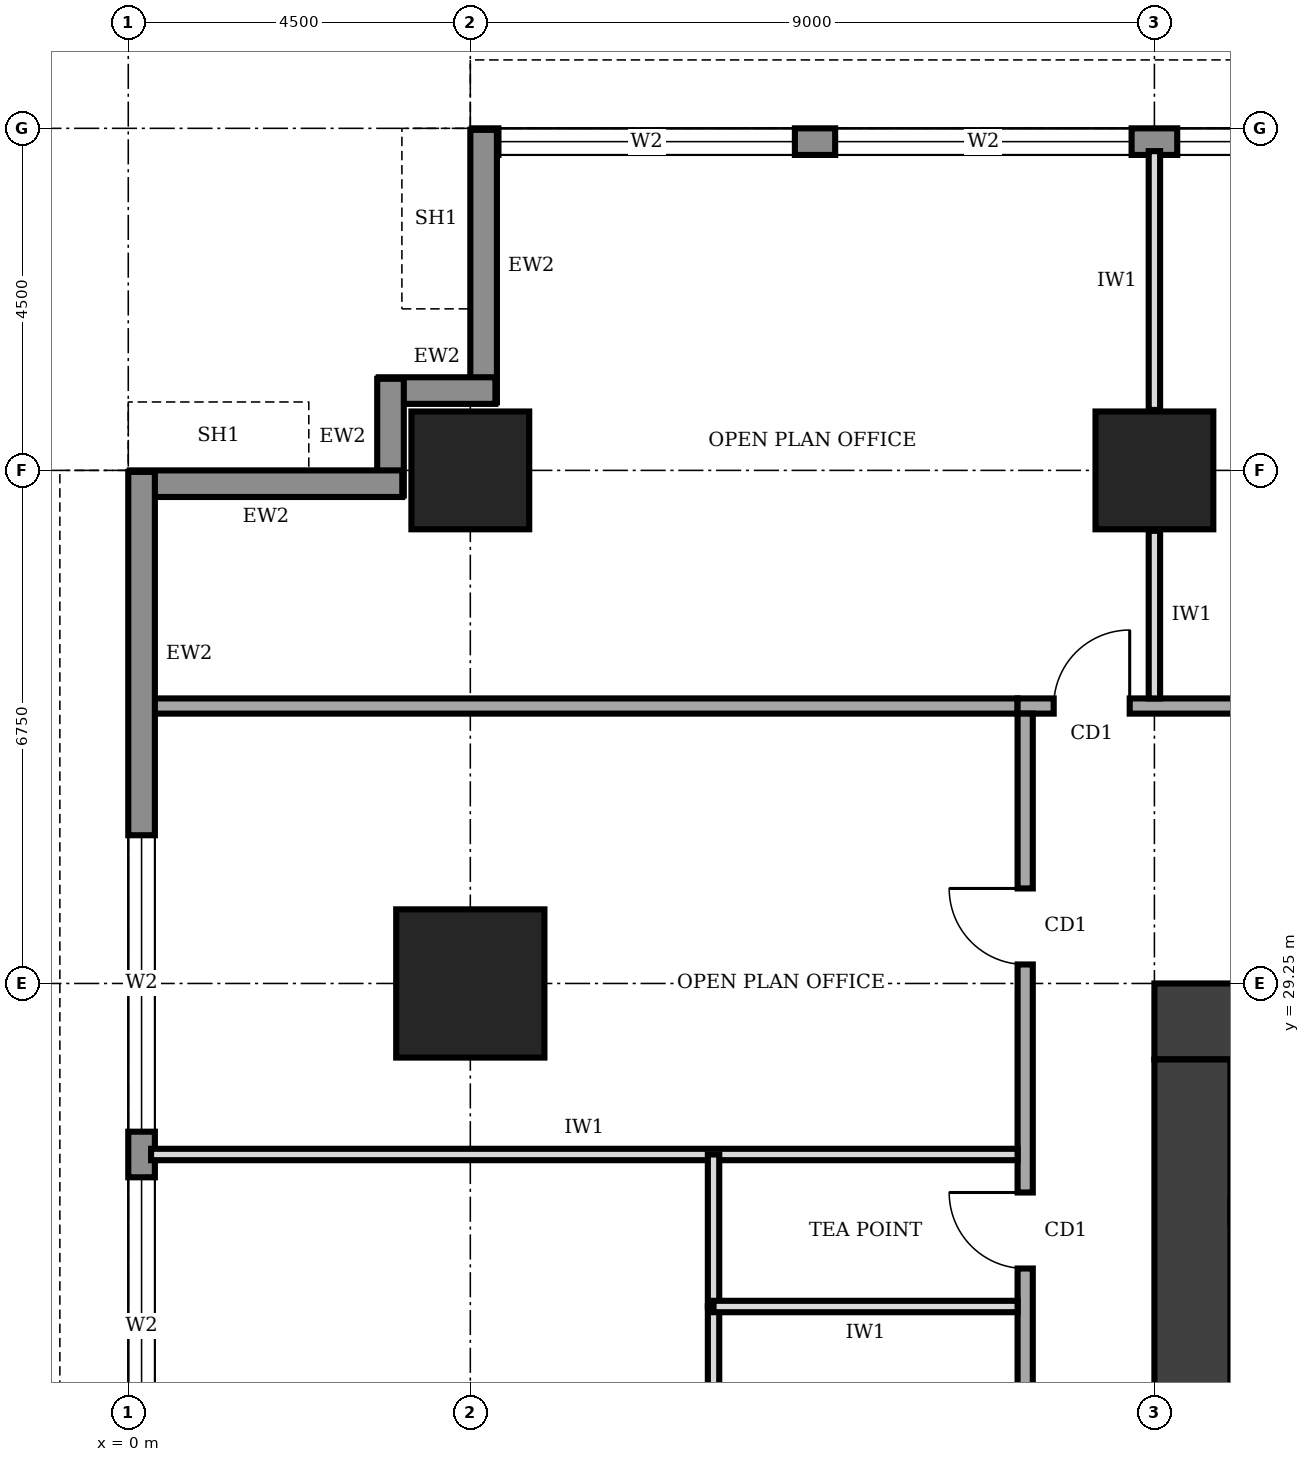
"""IFC4 building model, lengths in metres.
Left out: names, types, materials, properties, quantities, classifications, styles, units other than length and angle.
Written with IfcOpenShell. Run it as: python <this file> out.ifc"""

import sys

from ifc_helpers import new_model, si_unit, direction, frame, frame_2d, origin, origin_2d, place, context, subcontext, project, spatial, rectangle, extrude, element, fill, save


model = new_model("IFC4")
c1 = context("Model", 3, precision=1e-05, world=origin(), true_north=direction((0.0, 1.0)))
c2 = subcontext(c1, "Body", "Model", "MODEL_VIEW")
j1 = project(units=[si_unit("LENGTHUNIT", "METRE"), si_unit("PLANEANGLEUNIT", "RADIAN")], contexts=[c1])
p1 = place(None, origin())
s1 = spatial("IfcSite", under=j1, at=p1, CompositionType="ELEMENT")
p2 = place(p1, origin())
s2 = spatial("IfcBuilding", under=s1, at=p2, CompositionType="ELEMENT")
p3 = place(p2, frame((0.0, 0.0, 241.0)))
s3 = spatial("IfcBuildingStorey", under=s2, at=p3, CompositionType="ELEMENT", Elevation=241.0)
p4 = place(p3, frame((27.0, 28.75, 0.0), z_axis=(0.0, 0.0, 1.0), x_axis=(-1.0, 0.0, 0.0)))
e1 = element("IfcWall", 1, at=p4, inside=s3, PredefinedType="SHEAR", context=c2, shape_type="SweptSolid", body=[
    extrude(rectangle(XDim=13.5, YDim=1.0, at=frame_2d((6.75, 0.0))), origin(), (0.0, 0.0, 1.0), 4.0),
])
p5 = place(p4, frame((4.75, 0.0, 0.0)))
e2 = element("IfcOpeningElement", 2, at=p5, cuts=e1, PredefinedType="OPENING", context=c2, shape_type="SweptSolid", body=[
    extrude(rectangle(XDim=1.8, YDim=2.1, at=frame_2d((0.9, 1.05))), frame((0.0, 0.51, 0.0), z_axis=(0.0, -1.0, 0.0), x_axis=(1.0, 0.0, 0.0)), (0.0, 0.0, 1.0), 1.02),
])
p6 = place(p3, frame((14.0, 28.25, 0.0), z_axis=(0.0, 0.0, 1.0), x_axis=(0.0, -1.0, 0.0)))
e3 = element("IfcWall", 3, at=p6, inside=s3, PredefinedType="SHEAR", context=c2, shape_type="SweptSolid", body=[
    extrude(rectangle(XDim=16.0, YDim=1.0, at=frame_2d((8.0, 0.0))), origin(), (0.0, 0.0, 1.0), 4.0),
])
p7 = place(p3, frame((4.5, 29.25, 0.0), z_axis=(0.0, 0.0, 1.0), x_axis=(1.0, 0.0, 0.0)))
e4 = element("IfcColumn", 4, at=p7, inside=s3, PredefinedType="COLUMN", context=c2, shape_type="SweptSolid", body=[
    extrude(rectangle(XDim=1.95, YDim=1.95, at=origin_2d()), origin(), (0.0, 0.0, 1.0), 4.0),
])
for number, where, z_axis, x_axis in (
    (5, (4.5, 36.0, 0.0), (0.0, 0.0, 1.0), (1.0, 0.0, 0.0)),
    (6, (13.5, 36.0, 0.0), (0.0, 0.0, 1.0), (1.0, 0.0, 0.0)),
):
    element("IfcColumn", number, at=place(p3, frame(where, z_axis=z_axis, x_axis=x_axis)), inside=s3, PredefinedType="COLUMN", context=c2, shape_type="SweptSolid", body=[
        extrude(rectangle(XDim=1.55, YDim=1.55, at=origin_2d()), origin(), (0.0, 0.0, 1.0), 4.0),
    ])
p8 = place(p3, frame((35.98, 40.325, 0.0), z_axis=(0.0, 0.0, 1.0), x_axis=(-1.0, 0.0, 0.0)))
e7 = element("IfcWall", 7, at=p8, inside=s3, PredefinedType="STANDARD", context=c2, shape_type="SweptSolid", body=[
    extrude(rectangle(XDim=31.46, YDim=0.35, at=frame_2d((15.73, 0.0))), origin(), (0.0, 0.0, 1.0), 3.75),
])
p9 = place(p8, frame((27.21, 0.0, 0.6)))
e8 = element("IfcOpeningElement", 8, at=p9, cuts=e7, PredefinedType="OPENING", context=c2, shape_type="SweptSolid", body=[
    extrude(rectangle(XDim=3.9, YDim=2.6, at=frame_2d((1.95, 1.3))), frame((0.0, 0.185, 0.0), z_axis=(0.0, -1.0, 0.0), x_axis=(1.0, 0.0, 0.0)), (0.0, 0.0, 1.0), 0.37),
])
p10 = place(p8, frame((22.78, 0.0, 0.6)))
e9 = element("IfcOpeningElement", 9, at=p10, cuts=e7, PredefinedType="OPENING", context=c2, shape_type="SweptSolid", body=[
    extrude(rectangle(XDim=3.9, YDim=2.6, at=frame_2d((1.95, 1.3))), frame((0.0, 0.185, 0.0), z_axis=(0.0, -1.0, 0.0), x_axis=(1.0, 0.0, 0.0)), (0.0, 0.0, 1.0), 0.37),
])
p11 = place(p8, frame((18.28, 0.0, 0.6)))
e10 = element("IfcOpeningElement", 10, at=p11, cuts=e7, PredefinedType="OPENING", context=c2, shape_type="SweptSolid", body=[
    extrude(rectangle(XDim=3.9, YDim=2.6, at=frame_2d((1.95, 1.3))), frame((0.0, 0.185, 0.0), z_axis=(0.0, -1.0, 0.0), x_axis=(1.0, 0.0, 0.0)), (0.0, 0.0, 1.0), 0.37),
])
p12 = place(p8, frame((13.78, 0.0, 0.6)))
e11 = element("IfcOpeningElement", 11, at=p12, cuts=e7, PredefinedType="OPENING", context=c2, shape_type="SweptSolid", body=[
    extrude(rectangle(XDim=3.9, YDim=2.6, at=frame_2d((1.95, 1.3))), frame((0.0, 0.185, 0.0), z_axis=(0.0, -1.0, 0.0), x_axis=(1.0, 0.0, 0.0)), (0.0, 0.0, 1.0), 0.37),
])
p13 = place(p8, frame((9.28, 0.0, 0.6)))
e12 = element("IfcOpeningElement", 12, at=p13, cuts=e7, PredefinedType="OPENING", context=c2, shape_type="SweptSolid", body=[
    extrude(rectangle(XDim=3.9, YDim=2.6, at=frame_2d((1.95, 1.3))), frame((0.0, 0.185, 0.0), z_axis=(0.0, -1.0, 0.0), x_axis=(1.0, 0.0, 0.0)), (0.0, 0.0, 1.0), 0.37),
])
p14 = place(p8, frame((4.78, 0.0, 0.6)))
e13 = element("IfcOpeningElement", 13, at=p14, cuts=e7, PredefinedType="OPENING", context=c2, shape_type="SweptSolid", body=[
    extrude(rectangle(XDim=3.9, YDim=2.6, at=frame_2d((1.95, 1.3))), frame((0.0, 0.185, 0.0), z_axis=(0.0, -1.0, 0.0), x_axis=(1.0, 0.0, 0.0)), (0.0, 0.0, 1.0), 0.37),
])
p15 = place(p3, frame((4.675, 40.48, 0.0), z_axis=(0.0, 0.0, 1.0), x_axis=(0.0, -1.0, 0.0)))
e14 = element("IfcWall", 14, at=p15, inside=s3, PredefinedType="STANDARD", context=c2, shape_type="SweptSolid", body=[
    extrude(rectangle(XDim=3.585, YDim=0.35, at=frame_2d((1.792, 0.0))), origin(), (0.0, 0.0, 1.0), 2.75),
])
for number, where, z_axis, x_axis in (
    (15, (4.83, 37.05, 0.0), (0.0, 0.0, 1.0), (-1.0, 0.0, 0.0)),
    (16, (3.45, 37.205, 0.0), (0.0, 0.0, 1.0), (0.0, -1.0, 0.0)),
):
    element("IfcWall", number, at=place(p3, frame(where, z_axis=z_axis, x_axis=x_axis)), inside=s3, PredefinedType="STANDARD", context=c2, shape_type="SweptSolid", body=[
        extrude(rectangle(XDim=1.535, YDim=0.35, at=frame_2d((0.768, 0.0))), origin(), (0.0, 0.0, 1.0), 3.75),
    ])
p16 = place(p3, frame((3.605, 35.825, 0.0), z_axis=(0.0, 0.0, 1.0), x_axis=(-1.0, 0.0, 0.0)))
e17 = element("IfcWall", 17, at=p16, inside=s3, PredefinedType="STANDARD", context=c2, shape_type="SweptSolid", body=[
    extrude(rectangle(XDim=3.585, YDim=0.35, at=frame_2d((1.792, 0.0))), origin(), (0.0, 0.0, 1.0), 2.75),
])
p17 = place(p3, frame((0.175, 35.98, 0.0), z_axis=(0.0, 0.0, 1.0), x_axis=(0.0, -1.0, 0.0)))
e18 = element("IfcWall", 18, at=p17, inside=s3, PredefinedType="STANDARD", context=c2, shape_type="SweptSolid", body=[
    extrude(rectangle(XDim=31.46, YDim=0.35, at=frame_2d((15.73, 0.0))), origin(), (0.0, 0.0, 1.0), 3.75),
])
p18 = place(p17, frame((27.21, 0.0, 0.6)))
e19 = element("IfcOpeningElement", 19, at=p18, cuts=e18, PredefinedType="OPENING", context=c2, shape_type="SweptSolid", body=[
    extrude(rectangle(XDim=3.9, YDim=2.6, at=frame_2d((1.95, 1.3))), frame((0.0, 0.185, 0.0), z_axis=(0.0, -1.0, 0.0), x_axis=(1.0, 0.0, 0.0)), (0.0, 0.0, 1.0), 0.37),
])
p19 = place(p17, frame((22.78, 0.0, 0.6)))
e20 = element("IfcOpeningElement", 20, at=p19, cuts=e18, PredefinedType="OPENING", context=c2, shape_type="SweptSolid", body=[
    extrude(rectangle(XDim=3.9, YDim=2.6, at=frame_2d((1.95, 1.3))), frame((0.0, 0.185, 0.0), z_axis=(0.0, -1.0, 0.0), x_axis=(1.0, 0.0, 0.0)), (0.0, 0.0, 1.0), 0.37),
])
p20 = place(p17, frame((18.28, 0.0, 0.6)))
e21 = element("IfcOpeningElement", 21, at=p20, cuts=e18, PredefinedType="OPENING", context=c2, shape_type="SweptSolid", body=[
    extrude(rectangle(XDim=3.9, YDim=2.6, at=frame_2d((1.95, 1.3))), frame((0.0, 0.185, 0.0), z_axis=(0.0, -1.0, 0.0), x_axis=(1.0, 0.0, 0.0)), (0.0, 0.0, 1.0), 0.37),
])
p21 = place(p17, frame((13.78, 0.0, 0.6)))
e22 = element("IfcOpeningElement", 22, at=p21, cuts=e18, PredefinedType="OPENING", context=c2, shape_type="SweptSolid", body=[
    extrude(rectangle(XDim=3.9, YDim=2.6, at=frame_2d((1.95, 1.3))), frame((0.0, 0.185, 0.0), z_axis=(0.0, -1.0, 0.0), x_axis=(1.0, 0.0, 0.0)), (0.0, 0.0, 1.0), 0.37),
])
p22 = place(p17, frame((9.28, 0.0, 0.6)))
e23 = element("IfcOpeningElement", 23, at=p22, cuts=e18, PredefinedType="OPENING", context=c2, shape_type="SweptSolid", body=[
    extrude(rectangle(XDim=3.9, YDim=2.6, at=frame_2d((1.95, 1.3))), frame((0.0, 0.185, 0.0), z_axis=(0.0, -1.0, 0.0), x_axis=(1.0, 0.0, 0.0)), (0.0, 0.0, 1.0), 0.37),
])
p23 = place(p17, frame((4.78, 0.0, 0.6)))
e24 = element("IfcOpeningElement", 24, at=p23, cuts=e18, PredefinedType="OPENING", context=c2, shape_type="SweptSolid", body=[
    extrude(rectangle(XDim=3.9, YDim=2.6, at=frame_2d((1.95, 1.3))), frame((0.0, 0.185, 0.0), z_axis=(0.0, -1.0, 0.0), x_axis=(1.0, 0.0, 0.0)), (0.0, 0.0, 1.0), 0.37),
])
p24 = place(p3, frame((28.6, 32.9, 0.0), z_axis=(0.0, 0.0, 1.0), x_axis=(-1.0, 0.0, 0.0)))
e25 = element("IfcWall", 25, at=p24, inside=s3, PredefinedType="SOLIDWALL", context=c2, shape_type="SweptSolid", body=[
    extrude(rectangle(XDim=16.9, YDim=0.2, at=frame_2d((8.45, 0.0))), origin(), (0.0, 0.0, 1.0), 3.75),
])
p25 = place(p24, frame((15.425, 0.0, 0.0)))
e26 = element("IfcOpeningElement", 26, at=p25, cuts=e25, PredefinedType="OPENING", context=c2, shape_type="SweptSolid", body=[
    extrude(rectangle(XDim=1.0, YDim=2.1, at=frame_2d((0.5, 1.05))), frame((0.0, 0.11, 0.0), z_axis=(0.0, -1.0, 0.0), x_axis=(1.0, 0.0, 0.0)), (0.0, 0.0, 1.0), 0.22),
])
p26 = place(p24, frame((7.45, 0.0, 0.0)))
e27 = element("IfcOpeningElement", 27, at=p26, cuts=e25, PredefinedType="OPENING", context=c2, shape_type="SweptSolid", body=[
    extrude(rectangle(XDim=1.8, YDim=2.1, at=frame_2d((0.9, 1.05))), frame((0.0, 0.11, 0.0), z_axis=(0.0, -1.0, 0.0), x_axis=(1.0, 0.0, 0.0)), (0.0, 0.0, 1.0), 0.22),
])
p27 = place(p24, frame((0.275, 0.0, 0.0)))
e28 = element("IfcOpeningElement", 28, at=p27, cuts=e25, PredefinedType="OPENING", context=c2, shape_type="SweptSolid", body=[
    extrude(rectangle(XDim=1.0, YDim=2.1, at=frame_2d((0.5, 1.05))), frame((0.0, 0.11, 0.0), z_axis=(0.0, -1.0, 0.0), x_axis=(1.0, 0.0, 0.0)), (0.0, 0.0, 1.0), 0.22),
])
p28 = place(p3, frame((11.8, 32.8, 0.0), z_axis=(0.0, 0.0, 1.0), x_axis=(0.0, -1.0, 0.0)))
e29 = element("IfcWall", 29, at=p28, inside=s3, PredefinedType="SOLIDWALL", context=c2, shape_type="SweptSolid", body=[
    extrude(rectangle(XDim=25.3, YDim=0.2, at=frame_2d((12.65, 0.0))), origin(), (0.0, 0.0, 1.0), 3.75),
])
p29 = place(p28, frame((21.8, 0.0, 0.0)))
e30 = element("IfcOpeningElement", 30, at=p29, cuts=e29, PredefinedType="OPENING", context=c2, shape_type="SweptSolid", body=[
    extrude(rectangle(XDim=1.0, YDim=2.1, at=frame_2d((0.5, 1.05))), frame((0.0, 0.11, 0.0), z_axis=(0.0, -1.0, 0.0), x_axis=(1.0, 0.0, 0.0)), (0.0, 0.0, 1.0), 0.22),
])
p30 = place(p28, frame((17.65, 0.0, 0.0)))
e31 = element("IfcOpeningElement", 31, at=p30, cuts=e29, PredefinedType="OPENING", context=c2, shape_type="SweptSolid", body=[
    extrude(rectangle(XDim=0.9, YDim=2.1, at=frame_2d((0.45, 1.05))), frame((0.0, 0.11, 0.0), z_axis=(0.0, -1.0, 0.0), x_axis=(1.0, 0.0, 0.0)), (0.0, 0.0, 1.0), 0.22),
])
p31 = place(p28, frame((14.45, 0.0, 0.0)))
e32 = element("IfcOpeningElement", 32, at=p31, cuts=e29, PredefinedType="OPENING", context=c2, shape_type="SweptSolid", body=[
    extrude(rectangle(XDim=0.9, YDim=2.1, at=frame_2d((0.45, 1.05))), frame((0.0, 0.11, 0.0), z_axis=(0.0, -1.0, 0.0), x_axis=(1.0, 0.0, 0.0)), (0.0, 0.0, 1.0), 0.22),
])
p32 = place(p28, frame((8.9, 0.0, 0.0)))
e33 = element("IfcOpeningElement", 33, at=p32, cuts=e29, PredefinedType="OPENING", context=c2, shape_type="SweptSolid", body=[
    extrude(rectangle(XDim=0.9, YDim=2.1, at=frame_2d((0.45, 1.05))), frame((0.0, 0.11, 0.0), z_axis=(0.0, -1.0, 0.0), x_axis=(1.0, 0.0, 0.0)), (0.0, 0.0, 1.0), 0.22),
])
p33 = place(p28, frame((6.3, 0.0, 0.0)))
e34 = element("IfcOpeningElement", 34, at=p33, cuts=e29, PredefinedType="OPENING", context=c2, shape_type="SweptSolid", body=[
    extrude(rectangle(XDim=1.0, YDim=2.1, at=frame_2d((0.5, 1.05))), frame((0.0, 0.11, 0.0), z_axis=(0.0, -1.0, 0.0), x_axis=(1.0, 0.0, 0.0)), (0.0, 0.0, 1.0), 0.22),
])
p34 = place(p28, frame((11.4, 0.0, 0.0)))
e35 = element("IfcOpeningElement", 35, at=p34, cuts=e29, PredefinedType="OPENING", context=c2, shape_type="SweptSolid", body=[
    extrude(rectangle(XDim=1.0, YDim=2.1, at=frame_2d((0.5, 1.05))), frame((0.0, 0.11, 0.0), z_axis=(0.0, -1.0, 0.0), x_axis=(1.0, 0.0, 0.0)), (0.0, 0.0, 1.0), 0.22),
])
p35 = place(p28, frame((2.3, 0.0, 0.0)))
e36 = element("IfcOpeningElement", 36, at=p35, cuts=e29, PredefinedType="OPENING", context=c2, shape_type="SweptSolid", body=[
    extrude(rectangle(XDim=1.0, YDim=2.1, at=frame_2d((0.5, 1.05))), frame((0.0, 0.11, 0.0), z_axis=(0.0, -1.0, 0.0), x_axis=(1.0, 0.0, 0.0)), (0.0, 0.0, 1.0), 0.22),
])
p36 = place(p3, frame((0.3, 32.9, 0.0), z_axis=(0.0, 0.0, 1.0), x_axis=(1.0, 0.0, 0.0)))
e37 = element("IfcWall", 37, at=p36, inside=s3, PredefinedType="SOLIDWALL", context=c2, shape_type="SweptSolid", body=[
    extrude(rectangle(XDim=11.4, YDim=0.2, at=frame_2d((5.7, 0.0))), origin(), (0.0, 0.0, 1.0), 3.75),
])
p37 = place(p3, frame((13.5, 33.0, 0.0), z_axis=(0.0, 0.0, 1.0), x_axis=(0.0, 1.0, 0.0)))
e38 = element("IfcWall", 38, at=p37, inside=s3, PredefinedType="PARTITIONING", context=c2, shape_type="SweptSolid", body=[
    extrude(rectangle(XDim=2.205, YDim=0.15, at=frame_2d((1.103, 0.0))), origin(), (0.0, 0.0, 1.0), 3.75),
])
p38 = place(p3, frame((13.5, 36.795, 0.0), z_axis=(0.0, 0.0, 1.0), x_axis=(0.0, 1.0, 0.0)))
e39 = element("IfcWall", 39, at=p38, inside=s3, PredefinedType="PARTITIONING", context=c2, shape_type="SweptSolid", body=[
    extrude(rectangle(XDim=3.405, YDim=0.15, at=frame_2d((1.703, 0.0))), origin(), (0.0, 0.0, 1.0), 2.75),
])
p39 = place(p3, frame((0.3, 27.0, 0.0), z_axis=(0.0, 0.0, 1.0), x_axis=(1.0, 0.0, 0.0)))
e40 = element("IfcWall", 40, at=p39, inside=s3, PredefinedType="PARTITIONING", context=c2, shape_type="SweptSolid", body=[
    extrude(rectangle(XDim=11.4, YDim=0.15, at=frame_2d((5.7, 0.0))), origin(), (0.0, 0.0, 1.0), 3.75),
])
p40 = place(p3, frame((11.7, 25.0, 0.0), z_axis=(0.0, 0.0, 1.0), x_axis=(-1.0, 0.0, 0.0)))
e41 = element("IfcWall", 41, at=p40, inside=s3, PredefinedType="PARTITIONING", context=c2, shape_type="SweptSolid", body=[
    extrude(rectangle(XDim=4.0, YDim=0.15, at=frame_2d((2.0, 0.0))), origin(), (0.0, 0.0, 1.0), 3.75),
])
p41 = place(p3, frame((7.7, 21.9, 0.0), z_axis=(0.0, 0.0, 1.0), x_axis=(0.0, 1.0, 0.0)))
e42 = element("IfcWall", 42, at=p41, inside=s3, PredefinedType="PARTITIONING", context=c2, shape_type="SweptSolid", body=[
    extrude(rectangle(XDim=3.1, YDim=0.15, at=frame_2d((1.55, 0.0))), origin(), (0.0, 0.0, 1.0), 3.75),
])
p42 = place(p3, frame((7.7, 25.0, 0.0), z_axis=(0.0, 0.0, 1.0), x_axis=(0.0, 1.0, 0.0)))
e43 = element("IfcWall", 43, at=p42, inside=s3, PredefinedType="PARTITIONING", context=c2, shape_type="SweptSolid", body=[
    extrude(rectangle(XDim=2.0, YDim=0.15, at=frame_2d((1.0, 0.0))), origin(), (0.0, 0.0, 1.0), 3.75),
])
p43 = place(p9, origin())
e44 = element("IfcWindow", 44, at=p43, inside=s3, PartitioningType="SINGLE_PANEL", PredefinedType="WINDOW", context=c2, shape_type="SweptSolid", body=[
    extrude(rectangle(XDim=3.9, YDim=2.6, at=frame_2d((1.95, 1.3))), frame((0.0, 0.03, 0.0), z_axis=(0.0, -1.0, 0.0), x_axis=(1.0, 0.0, 0.0)), (0.0, 0.0, 1.0), 0.06),
])
fill(e8, e44)
p44 = place(p10, origin())
e45 = element("IfcWindow", 45, at=p44, inside=s3, PartitioningType="SINGLE_PANEL", PredefinedType="WINDOW", context=c2, shape_type="SweptSolid", body=[
    extrude(rectangle(XDim=3.9, YDim=2.6, at=frame_2d((1.95, 1.3))), frame((0.0, 0.03, 0.0), z_axis=(0.0, -1.0, 0.0), x_axis=(1.0, 0.0, 0.0)), (0.0, 0.0, 1.0), 0.06),
])
fill(e9, e45)
p45 = place(p11, origin())
e46 = element("IfcWindow", 46, at=p45, inside=s3, PartitioningType="SINGLE_PANEL", PredefinedType="WINDOW", context=c2, shape_type="SweptSolid", body=[
    extrude(rectangle(XDim=3.9, YDim=2.6, at=frame_2d((1.95, 1.3))), frame((0.0, 0.03, 0.0), z_axis=(0.0, -1.0, 0.0), x_axis=(1.0, 0.0, 0.0)), (0.0, 0.0, 1.0), 0.06),
])
fill(e10, e46)
p46 = place(p22, origin())
e47 = element("IfcWindow", 47, at=p46, inside=s3, PartitioningType="SINGLE_PANEL", PredefinedType="WINDOW", context=c2, shape_type="SweptSolid", body=[
    extrude(rectangle(XDim=3.9, YDim=2.6, at=frame_2d((1.95, 1.3))), frame((0.0, 0.03, 0.0), z_axis=(0.0, -1.0, 0.0), x_axis=(1.0, 0.0, 0.0)), (0.0, 0.0, 1.0), 0.06),
])
fill(e23, e47)
p47 = place(p23, origin())
e48 = element("IfcWindow", 48, at=p47, inside=s3, PartitioningType="SINGLE_PANEL", PredefinedType="WINDOW", context=c2, shape_type="SweptSolid", body=[
    extrude(rectangle(XDim=3.9, YDim=2.6, at=frame_2d((1.95, 1.3))), frame((0.0, 0.03, 0.0), z_axis=(0.0, -1.0, 0.0), x_axis=(1.0, 0.0, 0.0)), (0.0, 0.0, 1.0), 0.06),
])
fill(e24, e48)
p48 = place(p25, frame((1.0, 0.0, 0.0), z_axis=(0.0, 0.0, 1.0), x_axis=(-1.0, 0.0, 0.0)))
e49 = element("IfcDoor", 49, at=p48, inside=s3, OperationType="SINGLE_SWING_RIGHT", PredefinedType="DOOR", context=c2, shape_type="SweptSolid", body=[
    extrude(rectangle(XDim=1.0, YDim=2.1, at=frame_2d((0.5, 1.05))), frame((0.0, 0.025, 0.0), z_axis=(0.0, -1.0, 0.0), x_axis=(1.0, 0.0, 0.0)), (0.0, 0.0, 1.0), 0.05),
])
fill(e26, e49)
p49 = place(p33, frame((1.0, 0.0, 0.0), z_axis=(0.0, 0.0, 1.0), x_axis=(-1.0, 0.0, 0.0)))
e50 = element("IfcDoor", 50, at=p49, inside=s3, OperationType="SINGLE_SWING_RIGHT", PredefinedType="DOOR", context=c2, shape_type="SweptSolid", body=[
    extrude(rectangle(XDim=1.0, YDim=2.1, at=frame_2d((0.5, 1.05))), frame((0.0, 0.025, 0.0), z_axis=(0.0, -1.0, 0.0), x_axis=(1.0, 0.0, 0.0)), (0.0, 0.0, 1.0), 0.05),
])
fill(e34, e50)
p50 = place(p35, frame((1.0, 0.0, 0.0), z_axis=(0.0, 0.0, 1.0), x_axis=(-1.0, 0.0, 0.0)))
e51 = element("IfcDoor", 51, at=p50, inside=s3, OperationType="SINGLE_SWING_RIGHT", PredefinedType="DOOR", context=c2, shape_type="SweptSolid", body=[
    extrude(rectangle(XDim=1.0, YDim=2.1, at=frame_2d((0.5, 1.05))), frame((0.0, 0.025, 0.0), z_axis=(0.0, -1.0, 0.0), x_axis=(1.0, 0.0, 0.0)), (0.0, 0.0, 1.0), 0.05),
])
fill(e36, e51)
save(model, sys.argv[1])
